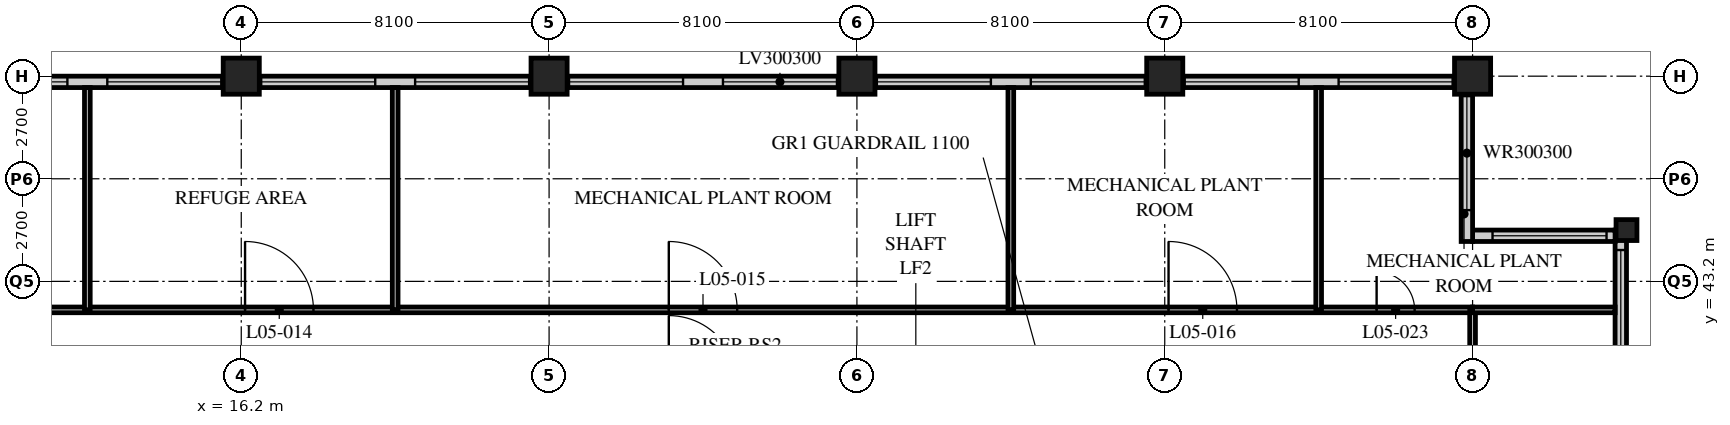
"""IFC4 building model, lengths in metres.
Left out: names, types, materials, properties, quantities, classifications, styles, units other than length and angle.
Written with IfcOpenShell. Run it as: python <this file> out.ifc"""

import sys

from ifc_helpers import new_model, si_unit, direction, frame, frame_2d, origin, origin_2d, place, context, subcontext, project, spatial, rectangle, hollow_rectangle, extrude, element, fill, save


model = new_model("IFC4")
c1 = context("Model", 3, precision=1e-05, world=origin(), true_north=direction((0.0, 1.0)))
c2 = subcontext(c1, "Body", "Model", "MODEL_VIEW")
j1 = project(units=[si_unit("LENGTHUNIT", "METRE"), si_unit("PLANEANGLEUNIT", "RADIAN")], contexts=[c1])
p1 = place(None, origin())
s1 = spatial("IfcSite", under=j1, at=p1, CompositionType="ELEMENT")
p2 = place(p1, origin())
s2 = spatial("IfcBuilding", under=s1, at=p2, CompositionType="ELEMENT")
p3 = place(p2, frame((0.0, 0.0, 27.6)))
s3 = spatial("IfcBuildingStorey", under=s2, at=p3, CompositionType="ELEMENT", Elevation=27.6)
for number, where, z_axis, x_axis in (
    (1, (16.2, 48.6, 0.0), (0.0, 0.0, 1.0), (1.0, 0.0, 0.0)),
    (2, (24.3, 48.6, 0.0), (0.0, 0.0, 1.0), (1.0, 0.0, 0.0)),
    (3, (32.4, 48.6, 0.0), (0.0, 0.0, 1.0), (1.0, 0.0, 0.0)),
    (4, (40.5, 48.6, 0.0), (0.0, 0.0, 1.0), (1.0, 0.0, 0.0)),
    (5, (48.6, 48.6, 0.0), (0.0, 0.0, 1.0), (1.0, 0.0, 0.0)),
):
    element("IfcColumn", number, at=place(p3, frame(where, z_axis=z_axis, x_axis=x_axis)), inside=s3, PredefinedType="COLUMN", context=c2, shape_type="SweptSolid", body=[
        extrude(hollow_rectangle(XDim=0.95, YDim=0.95, WallThickness=0.1, at=origin_2d()), origin(), (0.0, 0.0, 1.0), 5.4),
    ])
p4 = place(p3, frame((52.65, 44.55, 0.0), z_axis=(0.0, 0.0, 1.0), x_axis=(1.0, 0.0, 0.0)))
e6 = element("IfcColumn", 6, at=p4, inside=s3, PredefinedType="COLUMN", context=c2, shape_type="SweptSolid", body=[
    extrude(hollow_rectangle(XDim=0.55, YDim=0.55, WallThickness=0.05, at=origin_2d()), origin(), (0.0, 0.0, 1.0), 5.4),
])
p5 = place(p3, frame((52.5, 40.2, 0.0), z_axis=(0.0, 0.0, 1.0), x_axis=(0.0, 1.0, 0.0)))
e7 = element("IfcWall", 7, at=p5, inside=s3, PredefinedType="SOLIDWALL", context=c2, shape_type="SweptSolid", body=[
    extrude(rectangle(XDim=4.35, YDim=0.3, at=frame_2d((2.175, 0.0))), origin(), (0.0, 0.0, 1.0), 5.19),
])
p6 = place(p5, frame((0.825, 0.0, 0.9)))
e8 = element("IfcOpeningElement", 8, at=p6, cuts=e7, PredefinedType="OPENING", context=c2, shape_type="SweptSolid", body=[
    extrude(rectangle(XDim=3.0, YDim=3.0, at=frame_2d((1.5, 1.5))), frame((0.0, 0.16, 0.0), z_axis=(0.0, -1.0, 0.0), x_axis=(1.0, 0.0, 0.0)), (0.0, 0.0, 1.0), 0.32),
])
p7 = place(p3, frame((52.35, 44.4, 0.0), z_axis=(0.0, 0.0, 1.0), x_axis=(-1.0, 0.0, 0.0)))
e9 = element("IfcWall", 9, at=p7, inside=s3, PredefinedType="SOLIDWALL", context=c2, shape_type="SweptSolid", body=[
    extrude(rectangle(XDim=3.75, YDim=0.3, at=frame_2d((1.875, 0.0))), origin(), (0.0, 0.0, 1.0), 5.19),
])
p8 = place(p7, frame((0.225, 0.0, 0.9)))
e10 = element("IfcOpeningElement", 10, at=p8, cuts=e9, PredefinedType="OPENING", context=c2, shape_type="SweptSolid", body=[
    extrude(rectangle(XDim=3.0, YDim=3.0, at=frame_2d((1.5, 1.5))), frame((0.0, 0.16, 0.0), z_axis=(0.0, -1.0, 0.0), x_axis=(1.0, 0.0, 0.0)), (0.0, 0.0, 1.0), 0.32),
])
p9 = place(p3, frame((48.45, 44.25, 0.0), z_axis=(0.0, 0.0, 1.0), x_axis=(0.0, 1.0, 0.0)))
e11 = element("IfcWall", 11, at=p9, inside=s3, PredefinedType="SOLIDWALL", context=c2, shape_type="SweptSolid", body=[
    extrude(rectangle(XDim=4.35, YDim=0.3, at=frame_2d((2.175, 0.0))), origin(), (0.0, 0.0, 1.0), 5.19),
])
p10 = place(p9, frame((0.825, 0.0, 0.9)))
e12 = element("IfcOpeningElement", 12, at=p10, cuts=e11, PredefinedType="OPENING", context=c2, shape_type="SweptSolid", body=[
    extrude(rectangle(XDim=3.0, YDim=3.0, at=frame_2d((1.5, 1.5))), frame((0.0, 0.16, 0.0), z_axis=(0.0, -1.0, 0.0), x_axis=(1.0, 0.0, 0.0)), (0.0, 0.0, 1.0), 0.32),
])
p11 = place(p3, frame((48.3, 48.45, 0.0), z_axis=(0.0, 0.0, 1.0), x_axis=(-1.0, 0.0, 0.0)))
e13 = element("IfcWall", 13, at=p11, inside=s3, PredefinedType="SOLIDWALL", context=c2, shape_type="SweptSolid", body=[
    extrude(rectangle(XDim=40.2, YDim=0.3, at=frame_2d((20.1, 0.0))), origin(), (0.0, 0.0, 1.0), 5.19),
])
p12 = place(p11, frame((0.225, 0.0, 0.9)))
e14 = element("IfcOpeningElement", 14, at=p12, cuts=e13, PredefinedType="OPENING", context=c2, shape_type="SweptSolid", body=[
    extrude(rectangle(XDim=3.0, YDim=3.0, at=frame_2d((1.5, 1.5))), frame((0.0, 0.16, 0.0), z_axis=(0.0, -1.0, 0.0), x_axis=(1.0, 0.0, 0.0)), (0.0, 0.0, 1.0), 0.32),
])
p13 = place(p11, frame((4.275, 0.0, 0.9)))
e15 = element("IfcOpeningElement", 15, at=p13, cuts=e13, PredefinedType="OPENING", context=c2, shape_type="SweptSolid", body=[
    extrude(rectangle(XDim=3.0, YDim=3.0, at=frame_2d((1.5, 1.5))), frame((0.0, 0.16, 0.0), z_axis=(0.0, -1.0, 0.0), x_axis=(1.0, 0.0, 0.0)), (0.0, 0.0, 1.0), 0.32),
])
p14 = place(p11, frame((8.325, 0.0, 0.9)))
e16 = element("IfcOpeningElement", 16, at=p14, cuts=e13, PredefinedType="OPENING", context=c2, shape_type="SweptSolid", body=[
    extrude(rectangle(XDim=3.0, YDim=3.0, at=frame_2d((1.5, 1.5))), frame((0.0, 0.16, 0.0), z_axis=(0.0, -1.0, 0.0), x_axis=(1.0, 0.0, 0.0)), (0.0, 0.0, 1.0), 0.32),
])
p15 = place(p11, frame((12.375, 0.0, 0.9)))
e17 = element("IfcOpeningElement", 17, at=p15, cuts=e13, PredefinedType="OPENING", context=c2, shape_type="SweptSolid", body=[
    extrude(rectangle(XDim=3.0, YDim=3.0, at=frame_2d((1.5, 1.5))), frame((0.0, 0.16, 0.0), z_axis=(0.0, -1.0, 0.0), x_axis=(1.0, 0.0, 0.0)), (0.0, 0.0, 1.0), 0.32),
])
p16 = place(p11, frame((16.425, 0.0, 0.9)))
e18 = element("IfcOpeningElement", 18, at=p16, cuts=e13, PredefinedType="OPENING", context=c2, shape_type="SweptSolid", body=[
    extrude(rectangle(XDim=3.0, YDim=3.0, at=frame_2d((1.5, 1.5))), frame((0.0, 0.16, 0.0), z_axis=(0.0, -1.0, 0.0), x_axis=(1.0, 0.0, 0.0)), (0.0, 0.0, 1.0), 0.32),
])
p17 = place(p11, frame((20.475, 0.0, 0.9)))
e19 = element("IfcOpeningElement", 19, at=p17, cuts=e13, PredefinedType="OPENING", context=c2, shape_type="SweptSolid", body=[
    extrude(rectangle(XDim=3.0, YDim=3.0, at=frame_2d((1.5, 1.5))), frame((0.0, 0.16, 0.0), z_axis=(0.0, -1.0, 0.0), x_axis=(1.0, 0.0, 0.0)), (0.0, 0.0, 1.0), 0.32),
])
p18 = place(p11, frame((24.525, 0.0, 0.9)))
e20 = element("IfcOpeningElement", 20, at=p18, cuts=e13, PredefinedType="OPENING", context=c2, shape_type="SweptSolid", body=[
    extrude(rectangle(XDim=3.0, YDim=3.0, at=frame_2d((1.5, 1.5))), frame((0.0, 0.16, 0.0), z_axis=(0.0, -1.0, 0.0), x_axis=(1.0, 0.0, 0.0)), (0.0, 0.0, 1.0), 0.32),
])
p19 = place(p11, frame((28.575, 0.0, 0.9)))
e21 = element("IfcOpeningElement", 21, at=p19, cuts=e13, PredefinedType="OPENING", context=c2, shape_type="SweptSolid", body=[
    extrude(rectangle(XDim=3.0, YDim=3.0, at=frame_2d((1.5, 1.5))), frame((0.0, 0.16, 0.0), z_axis=(0.0, -1.0, 0.0), x_axis=(1.0, 0.0, 0.0)), (0.0, 0.0, 1.0), 0.32),
])
p20 = place(p11, frame((32.625, 0.0, 0.9)))
e22 = element("IfcOpeningElement", 22, at=p20, cuts=e13, PredefinedType="OPENING", context=c2, shape_type="SweptSolid", body=[
    extrude(rectangle(XDim=3.0, YDim=3.0, at=frame_2d((1.5, 1.5))), frame((0.0, 0.16, 0.0), z_axis=(0.0, -1.0, 0.0), x_axis=(1.0, 0.0, 0.0)), (0.0, 0.0, 1.0), 0.32),
])
p21 = place(p11, frame((36.675, 0.0, 0.9)))
e23 = element("IfcOpeningElement", 23, at=p21, cuts=e13, PredefinedType="OPENING", context=c2, shape_type="SweptSolid", body=[
    extrude(rectangle(XDim=3.0, YDim=3.0, at=frame_2d((1.5, 1.5))), frame((0.0, 0.16, 0.0), z_axis=(0.0, -1.0, 0.0), x_axis=(1.0, 0.0, 0.0)), (0.0, 0.0, 1.0), 0.32),
])
p22 = place(p3, frame((8.1, 42.45, 0.0), z_axis=(0.0, 0.0, 1.0), x_axis=(1.0, 0.0, 0.0)))
e24 = element("IfcWall", 24, at=p22, inside=s3, PredefinedType="PARTITIONING", context=c2, shape_type="SweptSolid", body=[
    extrude(rectangle(XDim=40.5, YDim=0.15, at=frame_2d((20.25, 0.0))), origin(), (0.0, 0.0, 1.0), 5.19),
])
p23 = place(p22, frame((8.2, 0.0, 0.0)))
e25 = element("IfcOpeningElement", 25, at=p23, cuts=e24, PredefinedType="OPENING", context=c2, shape_type="SweptSolid", body=[
    extrude(rectangle(XDim=1.8, YDim=2.4, at=frame_2d((0.9, 1.2))), frame((0.0, 0.085, 0.0), z_axis=(0.0, -1.0, 0.0), x_axis=(1.0, 0.0, 0.0)), (0.0, 0.0, 1.0), 0.17),
])
p24 = place(p22, frame((19.35, 0.0, 0.0)))
e26 = element("IfcOpeningElement", 26, at=p24, cuts=e24, PredefinedType="OPENING", context=c2, shape_type="SweptSolid", body=[
    extrude(rectangle(XDim=1.8, YDim=2.4, at=frame_2d((0.9, 1.2))), frame((0.0, 0.085, 0.0), z_axis=(0.0, -1.0, 0.0), x_axis=(1.0, 0.0, 0.0)), (0.0, 0.0, 1.0), 0.17),
])
p25 = place(p22, frame((32.5, 0.0, 0.0)))
e27 = element("IfcOpeningElement", 27, at=p25, cuts=e24, PredefinedType="OPENING", context=c2, shape_type="SweptSolid", body=[
    extrude(rectangle(XDim=1.8, YDim=2.4, at=frame_2d((0.9, 1.2))), frame((0.0, 0.085, 0.0), z_axis=(0.0, -1.0, 0.0), x_axis=(1.0, 0.0, 0.0)), (0.0, 0.0, 1.0), 0.17),
])
p26 = place(p22, frame((37.975, 0.0, 0.0)))
e28 = element("IfcOpeningElement", 28, at=p26, cuts=e24, PredefinedType="OPENING", context=c2, shape_type="SweptSolid", body=[
    extrude(rectangle(XDim=1.0, YDim=2.1, at=frame_2d((0.5, 1.05))), frame((0.0, 0.085, 0.0), z_axis=(0.0, -1.0, 0.0), x_axis=(1.0, 0.0, 0.0)), (0.0, 0.0, 1.0), 0.17),
])
p27 = place(p22, frame((1.525, 0.0, 0.0)))
e29 = element("IfcOpeningElement", 29, at=p27, cuts=e24, PredefinedType="OPENING", context=c2, shape_type="SweptSolid", body=[
    extrude(rectangle(XDim=1.0, YDim=2.1, at=frame_2d((0.5, 1.05))), frame((0.0, 0.085, 0.0), z_axis=(0.0, -1.0, 0.0), x_axis=(1.0, 0.0, 0.0)), (0.0, 0.0, 1.0), 0.17),
])
p28 = place(p3, frame((48.6, 8.1, 0.0), z_axis=(0.0, 0.0, 1.0), x_axis=(0.0, 1.0, 0.0)))
e30 = element("IfcWall", 30, at=p28, inside=s3, PredefinedType="PARTITIONING", context=c2, shape_type="SweptSolid", body=[
    extrude(rectangle(XDim=34.35, YDim=0.15, at=frame_2d((17.175, 0.0))), origin(), (0.0, 0.0, 1.0), 4.578),
])
p29 = place(p28, frame((8.95, 0.0, 0.0)))
e31 = element("IfcOpeningElement", 31, at=p29, cuts=e30, PredefinedType="OPENING", context=c2, shape_type="SweptSolid", body=[
    extrude(rectangle(XDim=1.8, YDim=2.4, at=frame_2d((0.9, 1.2))), frame((0.0, 0.085, 0.0), z_axis=(0.0, -1.0, 0.0), x_axis=(1.0, 0.0, 0.0)), (0.0, 0.0, 1.0), 0.17),
])
p30 = place(p28, frame((25.125, 0.0, 0.0)))
e32 = element("IfcOpeningElement", 32, at=p30, cuts=e30, PredefinedType="OPENING", context=c2, shape_type="SweptSolid", body=[
    extrude(rectangle(XDim=1.8, YDim=2.4, at=frame_2d((0.9, 1.2))), frame((0.0, 0.085, 0.0), z_axis=(0.0, -1.0, 0.0), x_axis=(1.0, 0.0, 0.0)), (0.0, 0.0, 1.0), 0.17),
])
for number, where, z_axis, x_axis in (
    (33, (20.25, 42.45, 0.0), (0.0, 0.0, 1.0), (0.0, 1.0, 0.0)),
    (34, (36.45, 42.45, 0.0), (0.0, 0.0, 1.0), (0.0, 1.0, 0.0)),
):
    element("IfcWall", number, at=place(p3, frame(where, z_axis=z_axis, x_axis=x_axis)), inside=s3, PredefinedType="PARTITIONING", context=c2, shape_type="SweptSolid", body=[
        extrude(rectangle(XDim=5.85, YDim=0.15, at=frame_2d((2.925, 0.0))), origin(), (0.0, 0.0, 1.0), 5.19),
    ])
p31 = place(p3, frame((48.6, 42.45, 0.0), z_axis=(0.0, 0.0, 1.0), x_axis=(1.0, 0.0, 0.0)))
e35 = element("IfcWall", 35, at=p31, inside=s3, PredefinedType="PARTITIONING", context=c2, shape_type="SweptSolid", body=[
    extrude(rectangle(XDim=3.75, YDim=0.15, at=frame_2d((1.875, 0.0))), origin(), (0.0, 0.0, 1.0), 5.19),
])
for number, where, z_axis, x_axis in (
    (36, (44.55, 42.45, 0.0), (0.0, 0.0, 1.0), (0.0, 1.0, 0.0)),
    (37, (12.15, 42.45, 0.0), (0.0, 0.0, 1.0), (0.0, 1.0, 0.0)),
):
    element("IfcWall", number, at=place(p3, frame(where, z_axis=z_axis, x_axis=x_axis)), inside=s3, PredefinedType="PARTITIONING", context=c2, shape_type="SweptSolid", body=[
        extrude(rectangle(XDim=5.85, YDim=0.15, at=frame_2d((2.925, 0.0))), origin(), (0.0, 0.0, 1.0), 5.19),
    ])
p32 = place(p6, origin())
e38 = element("IfcWindow", 38, at=p32, inside=s3, PartitioningType="SINGLE_PANEL", PredefinedType="WINDOW", context=c2, shape_type="SweptSolid", body=[
    extrude(rectangle(XDim=3.0, YDim=3.0, at=frame_2d((1.5, 1.5))), frame((0.0, 0.03, 0.0), z_axis=(0.0, -1.0, 0.0), x_axis=(1.0, 0.0, 0.0)), (0.0, 0.0, 1.0), 0.06),
])
fill(e8, e38)
p33 = place(p8, origin())
e39 = element("IfcWindow", 39, at=p33, inside=s3, PartitioningType="SINGLE_PANEL", PredefinedType="WINDOW", context=c2, shape_type="SweptSolid", body=[
    extrude(rectangle(XDim=3.0, YDim=3.0, at=frame_2d((1.5, 1.5))), frame((0.0, 0.03, 0.0), z_axis=(0.0, -1.0, 0.0), x_axis=(1.0, 0.0, 0.0)), (0.0, 0.0, 1.0), 0.06),
])
fill(e10, e39)
p34 = place(p10, origin())
e40 = element("IfcWindow", 40, at=p34, inside=s3, PartitioningType="SINGLE_PANEL", PredefinedType="WINDOW", context=c2, shape_type="SweptSolid", body=[
    extrude(rectangle(XDim=3.0, YDim=3.0, at=frame_2d((1.5, 1.5))), frame((0.0, 0.03, 0.0), z_axis=(0.0, -1.0, 0.0), x_axis=(1.0, 0.0, 0.0)), (0.0, 0.0, 1.0), 0.06),
])
fill(e12, e40)
p35 = place(p12, origin())
e41 = element("IfcWindow", 41, at=p35, inside=s3, PartitioningType="SINGLE_PANEL", PredefinedType="USERDEFINED", context=c2, shape_type="SweptSolid", body=[
    extrude(rectangle(XDim=3.0, YDim=3.0, at=frame_2d((1.5, 1.5))), frame((0.0, 0.075, 0.0), z_axis=(0.0, -1.0, 0.0), x_axis=(1.0, 0.0, 0.0)), (0.0, 0.0, 1.0), 0.15),
])
fill(e14, e41)
p36 = place(p13, origin())
e42 = element("IfcWindow", 42, at=p36, inside=s3, PartitioningType="SINGLE_PANEL", PredefinedType="USERDEFINED", context=c2, shape_type="SweptSolid", body=[
    extrude(rectangle(XDim=3.0, YDim=3.0, at=frame_2d((1.5, 1.5))), frame((0.0, 0.075, 0.0), z_axis=(0.0, -1.0, 0.0), x_axis=(1.0, 0.0, 0.0)), (0.0, 0.0, 1.0), 0.15),
])
fill(e15, e42)
p37 = place(p14, origin())
e43 = element("IfcWindow", 43, at=p37, inside=s3, PartitioningType="SINGLE_PANEL", PredefinedType="USERDEFINED", context=c2, shape_type="SweptSolid", body=[
    extrude(rectangle(XDim=3.0, YDim=3.0, at=frame_2d((1.5, 1.5))), frame((0.0, 0.075, 0.0), z_axis=(0.0, -1.0, 0.0), x_axis=(1.0, 0.0, 0.0)), (0.0, 0.0, 1.0), 0.15),
])
fill(e16, e43)
p38 = place(p15, origin())
e44 = element("IfcWindow", 44, at=p38, inside=s3, PartitioningType="SINGLE_PANEL", PredefinedType="USERDEFINED", context=c2, shape_type="SweptSolid", body=[
    extrude(rectangle(XDim=3.0, YDim=3.0, at=frame_2d((1.5, 1.5))), frame((0.0, 0.075, 0.0), z_axis=(0.0, -1.0, 0.0), x_axis=(1.0, 0.0, 0.0)), (0.0, 0.0, 1.0), 0.15),
])
fill(e17, e44)
p39 = place(p16, origin())
e45 = element("IfcWindow", 45, at=p39, inside=s3, PartitioningType="SINGLE_PANEL", PredefinedType="USERDEFINED", context=c2, shape_type="SweptSolid", body=[
    extrude(rectangle(XDim=3.0, YDim=3.0, at=frame_2d((1.5, 1.5))), frame((0.0, 0.075, 0.0), z_axis=(0.0, -1.0, 0.0), x_axis=(1.0, 0.0, 0.0)), (0.0, 0.0, 1.0), 0.15),
])
fill(e18, e45)
p40 = place(p17, origin())
e46 = element("IfcWindow", 46, at=p40, inside=s3, PartitioningType="SINGLE_PANEL", PredefinedType="USERDEFINED", context=c2, shape_type="SweptSolid", body=[
    extrude(rectangle(XDim=3.0, YDim=3.0, at=frame_2d((1.5, 1.5))), frame((0.0, 0.075, 0.0), z_axis=(0.0, -1.0, 0.0), x_axis=(1.0, 0.0, 0.0)), (0.0, 0.0, 1.0), 0.15),
])
fill(e19, e46)
p41 = place(p18, origin())
e47 = element("IfcWindow", 47, at=p41, inside=s3, PartitioningType="SINGLE_PANEL", PredefinedType="USERDEFINED", context=c2, shape_type="SweptSolid", body=[
    extrude(rectangle(XDim=3.0, YDim=3.0, at=frame_2d((1.5, 1.5))), frame((0.0, 0.075, 0.0), z_axis=(0.0, -1.0, 0.0), x_axis=(1.0, 0.0, 0.0)), (0.0, 0.0, 1.0), 0.15),
])
fill(e20, e47)
p42 = place(p19, origin())
e48 = element("IfcWindow", 48, at=p42, inside=s3, PartitioningType="SINGLE_PANEL", PredefinedType="USERDEFINED", context=c2, shape_type="SweptSolid", body=[
    extrude(rectangle(XDim=3.0, YDim=3.0, at=frame_2d((1.5, 1.5))), frame((0.0, 0.075, 0.0), z_axis=(0.0, -1.0, 0.0), x_axis=(1.0, 0.0, 0.0)), (0.0, 0.0, 1.0), 0.15),
])
fill(e21, e48)
p43 = place(p20, origin())
e49 = element("IfcWindow", 49, at=p43, inside=s3, PartitioningType="SINGLE_PANEL", PredefinedType="USERDEFINED", context=c2, shape_type="SweptSolid", body=[
    extrude(rectangle(XDim=3.0, YDim=3.0, at=frame_2d((1.5, 1.5))), frame((0.0, 0.075, 0.0), z_axis=(0.0, -1.0, 0.0), x_axis=(1.0, 0.0, 0.0)), (0.0, 0.0, 1.0), 0.15),
])
fill(e22, e49)
p44 = place(p21, origin())
e50 = element("IfcWindow", 50, at=p44, inside=s3, PartitioningType="SINGLE_PANEL", PredefinedType="USERDEFINED", context=c2, shape_type="SweptSolid", body=[
    extrude(rectangle(XDim=3.0, YDim=3.0, at=frame_2d((1.5, 1.5))), frame((0.0, 0.075, 0.0), z_axis=(0.0, -1.0, 0.0), x_axis=(1.0, 0.0, 0.0)), (0.0, 0.0, 1.0), 0.15),
])
fill(e23, e50)
p45 = place(p23, origin())
e51 = element("IfcDoor", 51, at=p45, inside=s3, OperationType="DOUBLE_DOOR_SINGLE_SWING", PredefinedType="DOOR", context=c2, shape_type="SweptSolid", body=[
    extrude(rectangle(XDim=1.8, YDim=2.4, at=frame_2d((0.9, 1.2))), frame((0.0, 0.025, 0.0), z_axis=(0.0, -1.0, 0.0), x_axis=(1.0, 0.0, 0.0)), (0.0, 0.0, 1.0), 0.05),
])
fill(e25, e51)
p46 = place(p24, origin())
e52 = element("IfcDoor", 52, at=p46, inside=s3, OperationType="DOUBLE_DOOR_SINGLE_SWING", PredefinedType="DOOR", context=c2, shape_type="SweptSolid", body=[
    extrude(rectangle(XDim=1.8, YDim=2.4, at=frame_2d((0.9, 1.2))), frame((0.0, 0.025, 0.0), z_axis=(0.0, -1.0, 0.0), x_axis=(1.0, 0.0, 0.0)), (0.0, 0.0, 1.0), 0.05),
])
fill(e26, e52)
p47 = place(p25, origin())
e53 = element("IfcDoor", 53, at=p47, inside=s3, OperationType="DOUBLE_DOOR_SINGLE_SWING", PredefinedType="DOOR", context=c2, shape_type="SweptSolid", body=[
    extrude(rectangle(XDim=1.8, YDim=2.4, at=frame_2d((0.9, 1.2))), frame((0.0, 0.025, 0.0), z_axis=(0.0, -1.0, 0.0), x_axis=(1.0, 0.0, 0.0)), (0.0, 0.0, 1.0), 0.05),
])
fill(e27, e53)
p48 = place(p26, origin())
e54 = element("IfcDoor", 54, at=p48, inside=s3, OperationType="SINGLE_SWING_LEFT", PredefinedType="DOOR", context=c2, shape_type="SweptSolid", body=[
    extrude(rectangle(XDim=1.0, YDim=2.1, at=frame_2d((0.5, 1.05))), frame((0.0, 0.025, 0.0), z_axis=(0.0, -1.0, 0.0), x_axis=(1.0, 0.0, 0.0)), (0.0, 0.0, 1.0), 0.05),
])
fill(e28, e54)
save(model, sys.argv[1])
